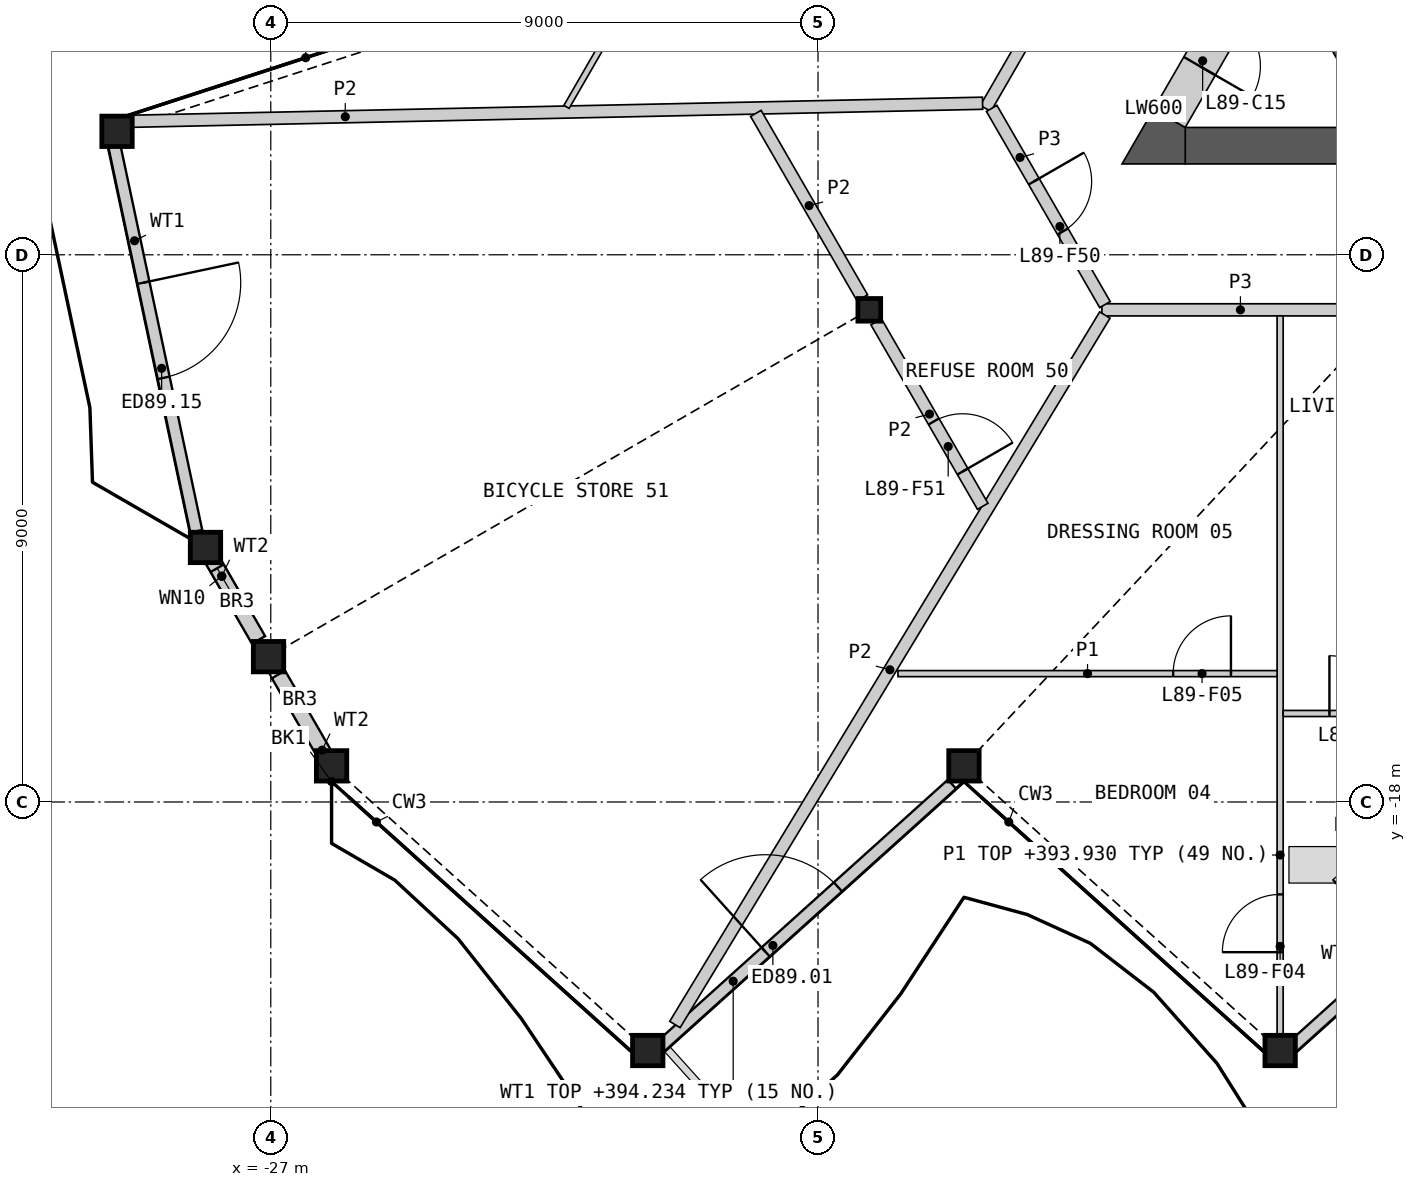
"""IFC4 building model, lengths in metres.
Left out: names, types, materials, properties, quantities, classifications, styles, units other than length and angle.
Written with IfcOpenShell. Run it as: python <this file> out.ifc"""

import sys

from ifc_helpers import new_model, si_unit, direction, frame, frame_2d, origin, origin_2d, place, context, subcontext, project, spatial, polyline, rectangle, hollow_rectangle, i_section, outline, extrude, element, fill, save


model = new_model("IFC4")
c1 = context("Model", 3, precision=1e-05, world=origin(), true_north=direction((0.0, 1.0)))
c2 = subcontext(c1, "Body", "Model", "MODEL_VIEW")
j1 = project(units=[si_unit("LENGTHUNIT", "METRE"), si_unit("PLANEANGLEUNIT", "RADIAN")], contexts=[c1])
p1 = place(None, origin())
s1 = spatial("IfcSite", under=j1, at=p1, CompositionType="ELEMENT")
p2 = place(p1, origin())
s2 = spatial("IfcBuilding", under=s1, at=p2, CompositionType="ELEMENT")
p3 = place(p2, frame((0.0, 0.0, 391.6)))
s3 = spatial("IfcBuildingStorey", under=s2, at=p3, CompositionType="ELEMENT", Elevation=391.6)
for number, where, z_axis, x_axis in (
    (1, (-26.0, -17.406, 0.0), (0.0, 0.0, 1.0), (1.0, 0.0, 0.0)),
    (2, (-20.8, -22.088, 0.0), (0.0, 0.0, 1.0), (1.0, 0.0, 0.0)),
    (3, (-15.6, -17.406, 0.0), (0.0, 0.0, 1.0), (1.0, 0.0, 0.0)),
    (4, (-10.4, -22.088, 0.0), (0.0, 0.0, 1.0), (1.0, 0.0, 0.0)),
    (5, (-29.529, -6.969, 0.0), (0.0, 0.0, 1.0), (1.0, 0.0, 0.0)),
    (6, (-28.074, -13.814, 0.0), (0.0, 0.0, 1.0), (1.0, 0.0, 0.0)),
    (7, (-27.037, -15.61, 0.0), (0.0, 0.0, 1.0), (1.0, 0.0, 0.0)),
):
    element("IfcColumn", number, at=place(p3, frame(where, z_axis=z_axis, x_axis=x_axis)), inside=s3, PredefinedType="COLUMN", context=c2, shape_type="SweptSolid", body=[
        extrude(hollow_rectangle(XDim=0.5, YDim=0.5, WallThickness=0.03, at=origin_2d()), origin(), (0.0, 0.0, 1.0), 3.4),
    ])
p4 = place(p3, frame((-17.157, -9.906, 0.0), z_axis=(0.0, 0.0, 1.0), x_axis=(1.0, 0.0, 0.0)))
e8 = element("IfcColumn", 8, at=p4, inside=s3, PredefinedType="COLUMN", context=c2, shape_type="SweptSolid", body=[
    extrude(i_section(OverallWidth=0.374, OverallDepth=0.372, WebThickness=0.016, FlangeThickness=0.026, at=origin_2d()), origin(), (0.0, 0.0, 1.0), 3.4),
])
p5 = place(p3, frame((-20.595, -22.028, 0.0), z_axis=(0.0, 0.0, 1.0), x_axis=(0.743153126052, 0.669121387522, 0.0)))
e9 = element("IfcWall", 9, at=p5, inside=s3, PredefinedType="SOLIDWALL", context=c2, shape_type="SweptSolid", body=[
    extrude(rectangle(XDim=6.457, YDim=0.2, at=frame_2d((3.229, 0.0))), origin(), (0.0, 0.0, 1.0), 2.634),
])
p6 = place(p5, frame((2.333, 0.0, 0.0)))
e10 = element("IfcOpeningElement", 10, at=p6, cuts=e9, PredefinedType="OPENING", context=c2, shape_type="SweptSolid", body=[
    extrude(rectangle(XDim=1.6, YDim=2.25, at=frame_2d((0.8, 1.125))), frame((0.0, 0.11, 0.0), z_axis=(0.0, -1.0, 0.0), x_axis=(1.0, 0.0, 0.0)), (0.0, 0.0, 1.0), 0.22),
])
p7 = place(p3, frame((-10.195, -22.028, 0.0), z_axis=(0.0, 0.0, 1.0), x_axis=(0.743136196971, 0.669140189162, 0.0)))
e11 = element("IfcWall", 11, at=p7, inside=s3, PredefinedType="SOLIDWALL", context=c2, shape_type="SweptSolid", body=[
    extrude(rectangle(XDim=6.457, YDim=0.2, at=frame_2d((3.229, 0.0))), origin(), (0.0, 0.0, 1.0), 2.634),
])
p8 = place(p7, frame((2.333, 0.0, 0.0)))
e12 = element("IfcOpeningElement", 12, at=p8, cuts=e11, PredefinedType="OPENING", context=c2, shape_type="SweptSolid", body=[
    extrude(rectangle(XDim=1.6, YDim=2.25, at=frame_2d((0.8, 1.125))), frame((0.0, 0.11, 0.0), z_axis=(0.0, -1.0, 0.0), x_axis=(1.0, 0.0, 0.0)), (0.0, 0.0, 1.0), 0.22),
])
p9 = place(p3, frame((-29.579, -7.177, 0.0), z_axis=(0.0, 0.0, 1.0), x_axis=(0.207910765171, -0.978147797486, 0.0)))
e13 = element("IfcWall", 13, at=p9, inside=s3, PredefinedType="SOLIDWALL", context=c2, shape_type="SweptSolid", body=[
    extrude(rectangle(XDim=6.512, YDim=0.2, at=frame_2d((3.256, 0.0))), origin(), (0.0, 0.0, 1.0), 2.634),
])
p10 = place(p9, frame((2.333, 0.0, 0.0)))
e14 = element("IfcOpeningElement", 14, at=p10, cuts=e13, PredefinedType="OPENING", context=c2, shape_type="SweptSolid", body=[
    extrude(rectangle(XDim=1.6, YDim=2.25, at=frame_2d((0.8, 1.125))), frame((0.0, 0.11, 0.0), z_axis=(0.0, -1.0, 0.0), x_axis=(1.0, 0.0, 0.0)), (0.0, 0.0, 1.0), 0.22),
])
p11 = place(p3, frame((-28.007, -13.939, 0.0), z_axis=(0.0, 0.0, 1.0), x_axis=(0.499967189098, -0.866044346339, 0.0)))
e15 = element("IfcWall", 15, at=p11, inside=s3, PredefinedType="SOLIDWALL", context=c2, shape_type="SweptSolid", body=[
    extrude(rectangle(XDim=1.612, YDim=0.25, at=frame_2d((0.806, 0.0))), origin(), (0.0, 0.0, 1.0), 2.634),
])
p12 = place(p11, frame((0.25, 0.0, 0.4)))
e16 = element("IfcOpeningElement", 16, at=p12, cuts=e15, PredefinedType="OPENING", context=c2, shape_type="SweptSolid", body=[
    extrude(rectangle(XDim=0.6, YDim=0.6, at=frame_2d((0.3, 0.3))), frame((0.0, 0.135, 0.0), z_axis=(0.0, -1.0, 0.0), x_axis=(1.0, 0.0, 0.0)), (0.0, 0.0, 1.0), 0.27),
])
p13 = place(p3, frame((-26.874, -15.902, 0.0), z_axis=(0.0, 0.0, 1.0), x_axis=(0.500017882314, -0.866015079179, 0.0)))
e17 = element("IfcWall", 17, at=p13, inside=s3, PredefinedType="SOLIDWALL", context=c2, shape_type="SweptSolid", body=[
    extrude(rectangle(XDim=1.598, YDim=0.25, at=frame_2d((0.799, 0.0))), origin(), (0.0, 0.0, 1.0), 2.634),
])
p14 = place(p3, origin())
e18 = element("IfcWall", 18, at=p14, inside=s3, PredefinedType="SHEAR", context=c2, shape_type="SweptSolid", body=[
    extrude(outline(polyline([(-10.374, -4.206), (-8.83, -6.881), (-8.738, -6.539), (-10.032, -4.298), (-10.374, -4.206)])), origin(), (0.0, 0.0, 1.0), 3.1),
])
p15 = place(p3, frame((-11.961, -7.206, 0.0), z_axis=(0.0, 0.0, 1.0), x_axis=(1.0, 0.0, 0.0)))
e19 = element("IfcWall", 19, at=p15, inside=s3, PredefinedType="SHEAR", context=c2, shape_type="SweptSolid", body=[
    extrude(rectangle(XDim=23.921, YDim=0.6, at=frame_2d((11.961, 0.0))), origin(), (0.0, 0.0, 1.0), 3.1),
])
p16 = place(p3, origin())
e20 = element("IfcWall", 20, at=p16, inside=s3, PredefinedType="SHEAR", context=c2, shape_type="SweptSolid", body=[
    extrude(outline(polyline([(-12.48, -6.606), (-11.961, -6.906), (-11.961, -7.506), (-13.0, -7.506), (-12.48, -6.606)])), origin(), (0.0, 0.0, 1.0), 3.1),
])
p17 = place(p3, frame((-10.925, -4.511, 0.0), z_axis=(0.0, 0.0, 1.0), x_axis=(-0.500018667571, -0.866014625789, 0.0)))
e21 = element("IfcWall", 21, at=p17, inside=s3, PredefinedType="SHEAR", context=c2, shape_type="SweptSolid", body=[
    extrude(rectangle(XDim=2.592, YDim=0.6, at=frame_2d((1.296, 0.0))), origin(), (0.0, 0.0, 1.0), 3.1),
])
p18 = place(p17, frame((0.6, 0.0, 0.0)))
e22 = element("IfcOpeningElement", 22, at=p18, cuts=e21, PredefinedType="OPENING", context=c2, shape_type="SweptSolid", body=[
    extrude(rectangle(XDim=1.0, YDim=2.1, at=frame_2d((0.5, 1.05))), frame((0.0, 0.31, 0.0), z_axis=(0.0, -1.0, 0.0), x_axis=(1.0, 0.0, 0.0)), (0.0, 0.0, 1.0), 0.62),
])
p19 = place(p3, frame((-13.331, -9.906, 0.0), z_axis=(0.0, 0.0, 1.0), x_axis=(1.0, 0.0, 0.0)))
e23 = element("IfcWall", 23, at=p19, inside=s3, PredefinedType="PARTITIONING", context=c2, shape_type="SweptSolid", body=[
    extrude(rectangle(XDim=4.555, YDim=0.2, at=frame_2d((2.278, 0.0))), origin(), (0.0, 0.0, 1.0), 3.1),
])
p20 = place(p3, frame((-15.244, -6.592, 0.0), z_axis=(0.0, 0.0, 1.0), x_axis=(0.499974648164, 0.866040040179, 0.0)))
e24 = element("IfcWall", 24, at=p20, inside=s3, PredefinedType="PARTITIONING", context=c2, shape_type="SweptSolid", body=[
    extrude(rectangle(XDim=4.525, YDim=0.2, at=frame_2d((2.263, 0.0))), origin(), (0.0, 0.0, 1.0), 3.1),
])
p21 = place(p3, frame((-15.144, -6.592, 0.0), z_axis=(0.0, 0.0, 1.0), x_axis=(0.499958791762, -0.866049194065, 0.0)))
e25 = element("IfcWall", 25, at=p21, inside=s3, PredefinedType="PARTITIONING", context=c2, shape_type="SweptSolid", body=[
    extrude(rectangle(XDim=3.726, YDim=0.2, at=frame_2d((1.863, 0.0))), origin(), (0.0, 0.0, 1.0), 3.1),
])
p22 = place(p21, frame((1.388, 0.0, 0.0)))
e26 = element("IfcOpeningElement", 26, at=p22, cuts=e25, PredefinedType="OPENING", context=c2, shape_type="SweptSolid", body=[
    extrude(rectangle(XDim=0.95, YDim=2.1, at=frame_2d((0.475, 1.05))), frame((0.0, 0.11, 0.0), z_axis=(0.0, -1.0, 0.0), x_axis=(1.0, 0.0, 0.0)), (0.0, 0.0, 1.0), 0.22),
])
p23 = place(p3, frame((-20.354, -21.66, 0.0), z_axis=(0.0, 0.0, 1.0), x_axis=(0.518240642668, 0.85523484277, 0.0)))
e27 = element("IfcWall", 27, at=p23, inside=s3, PredefinedType="PARTITIONING", context=c2, shape_type="SweptSolid", body=[
    extrude(rectangle(XDim=13.644, YDim=0.2, at=frame_2d((6.822, 0.0))), origin(), (0.0, 0.0, 1.0), 2.33),
])
p24 = place(p3, frame((-29.269, -6.804, 0.0), z_axis=(0.0, 0.0, 1.0), x_axis=(0.999775536303, 0.021186717777, 0.0)))
e28 = element("IfcWall", 28, at=p24, inside=s3, PredefinedType="PARTITIONING", context=c2, shape_type="SweptSolid", body=[
    extrude(rectangle(XDim=13.978, YDim=0.2, at=frame_2d((6.989, 0.0))), origin(), (0.0, 0.0, 1.0), 2.33),
])
p25 = place(p3, frame((-17.043, -10.103, 0.0), z_axis=(0.0, 0.0, 1.0), x_axis=(0.500005931509, -0.866021979199, 0.0)))
e29 = element("IfcWall", 29, at=p25, inside=s3, PredefinedType="PARTITIONING", context=c2, shape_type="SweptSolid", body=[
    extrude(rectangle(XDim=3.504, YDim=0.2, at=frame_2d((1.752, 0.0))), origin(), (0.0, 0.0, 1.0), 2.33),
])
p26 = place(p25, frame((1.893, 0.0, 0.0)))
e30 = element("IfcOpeningElement", 30, at=p26, cuts=e29, PredefinedType="OPENING", context=c2, shape_type="SweptSolid", body=[
    extrude(rectangle(XDim=0.95, YDim=2.1, at=frame_2d((0.475, 1.05))), frame((0.0, 0.11, 0.0), z_axis=(0.0, -1.0, 0.0), x_axis=(1.0, 0.0, 0.0)), (0.0, 0.0, 1.0), 0.22),
])
p27 = place(p3, frame((-19.022, -6.674, 0.0), z_axis=(0.0, 0.0, 1.0), x_axis=(0.499983843005, -0.866034731829, 0.0)))
e31 = element("IfcWall", 31, at=p27, inside=s3, PredefinedType="PARTITIONING", context=c2, shape_type="SweptSolid", body=[
    extrude(rectangle(XDim=3.503, YDim=0.2, at=frame_2d((1.752, 0.0))), origin(), (0.0, 0.0, 1.0), 2.33),
])
p28 = place(p3, frame((-10.4, -21.828, 0.0), z_axis=(0.0, 0.0, 1.0), x_axis=(0.0, 1.0, 0.0)))
e32 = element("IfcWall", 32, at=p28, inside=s3, PredefinedType="PARTITIONING", context=c2, shape_type="SweptSolid", body=[
    extrude(rectangle(XDim=11.822, YDim=0.1, at=frame_2d((5.911, 0.0))), origin(), (0.0, 0.0, 1.0), 2.33),
])
p29 = place(p28, frame((1.358, 0.0, 0.0)))
e33 = element("IfcOpeningElement", 33, at=p29, cuts=e32, PredefinedType="OPENING", context=c2, shape_type="SweptSolid", body=[
    extrude(rectangle(XDim=0.95, YDim=2.1, at=frame_2d((0.475, 1.05))), frame((0.0, 0.06, 0.0), z_axis=(0.0, -1.0, 0.0), x_axis=(1.0, 0.0, 0.0)), (0.0, 0.0, 1.0), 0.12),
])
p30 = place(p3, frame((-22.136, -6.567, 0.0), z_axis=(0.0, 0.0, 1.0), x_axis=(0.500016298831, 0.866015993445, 0.0)))
e34 = element("IfcWall", 34, at=p30, inside=s3, PredefinedType="PARTITIONING", context=c2, shape_type="SweptSolid", body=[
    extrude(rectangle(XDim=6.305, YDim=0.1, at=frame_2d((3.152, 0.0))), origin(), (0.0, 0.0, 1.0), 2.33),
])
p31 = place(p30, frame((2.88, 0.0, 0.0)))
e35 = element("IfcOpeningElement", 35, at=p31, cuts=e34, PredefinedType="OPENING", context=c2, shape_type="SweptSolid", body=[
    extrude(rectangle(XDim=0.95, YDim=2.1, at=frame_2d((0.475, 1.05))), frame((0.0, 0.06, 0.0), z_axis=(0.0, -1.0, 0.0), x_axis=(1.0, 0.0, 0.0)), (0.0, 0.0, 1.0), 0.12),
])
p32 = place(p3, frame((-16.685, -15.889, 0.0), z_axis=(0.0, 0.0, 1.0), x_axis=(1.0, 0.0, 0.0)))
e36 = element("IfcWall", 36, at=p32, inside=s3, PredefinedType="PARTITIONING", context=c2, shape_type="SweptSolid", body=[
    extrude(rectangle(XDim=6.235, YDim=0.1, at=frame_2d((3.118, 0.0))), origin(), (0.0, 0.0, 1.0), 2.33),
])
p33 = place(p32, frame((4.526, 0.0, 0.0)))
e37 = element("IfcOpeningElement", 37, at=p33, cuts=e36, PredefinedType="OPENING", context=c2, shape_type="SweptSolid", body=[
    extrude(rectangle(XDim=0.95, YDim=2.1, at=frame_2d((0.475, 1.05))), frame((0.0, 0.06, 0.0), z_axis=(0.0, -1.0, 0.0), x_axis=(1.0, 0.0, 0.0)), (0.0, 0.0, 1.0), 0.12),
])
p34 = place(p3, frame((-10.35, -16.544, 0.0), z_axis=(0.0, 0.0, 1.0), x_axis=(1.0, 0.0, 0.0)))
e38 = element("IfcWall", 38, at=p34, inside=s3, PredefinedType="PARTITIONING", context=c2, shape_type="SweptSolid", body=[
    extrude(rectangle(XDim=5.025, YDim=0.1, at=frame_2d((2.513, 0.0))), origin(), (0.0, 0.0, 1.0), 2.33),
])
p35 = place(p34, frame((0.761, 0.0, 0.0)))
e39 = element("IfcOpeningElement", 39, at=p35, cuts=e38, PredefinedType="OPENING", context=c2, shape_type="SweptSolid", body=[
    extrude(rectangle(XDim=0.95, YDim=2.1, at=frame_2d((0.475, 1.05))), frame((0.0, 0.06, 0.0), z_axis=(0.0, -1.0, 0.0), x_axis=(1.0, 0.0, 0.0)), (0.0, 0.0, 1.0), 0.12),
])
p36 = place(p6, origin())
e40 = element("IfcDoor", 40, at=p36, inside=s3, OperationType="DOUBLE_DOOR_SINGLE_SWING", PredefinedType="DOOR", context=c2, shape_type="SweptSolid", body=[
    extrude(rectangle(XDim=1.6, YDim=2.25, at=frame_2d((0.8, 1.125))), frame((0.0, 0.025, 0.0), z_axis=(0.0, -1.0, 0.0), x_axis=(1.0, 0.0, 0.0)), (0.0, 0.0, 1.0), 0.05),
])
fill(e10, e40)
p37 = place(p10, origin())
e41 = element("IfcDoor", 41, at=p37, inside=s3, OperationType="DOUBLE_DOOR_SINGLE_SWING", PredefinedType="DOOR", context=c2, shape_type="SweptSolid", body=[
    extrude(rectangle(XDim=1.6, YDim=2.25, at=frame_2d((0.8, 1.125))), frame((0.0, 0.025, 0.0), z_axis=(0.0, -1.0, 0.0), x_axis=(1.0, 0.0, 0.0)), (0.0, 0.0, 1.0), 0.05),
])
fill(e14, e41)
p38 = place(p12, origin())
e42 = element("IfcWindow", 42, at=p38, inside=s3, PartitioningType="SINGLE_PANEL", PredefinedType="WINDOW", context=c2, shape_type="SweptSolid", body=[
    extrude(rectangle(XDim=0.6, YDim=0.6, at=frame_2d((0.3, 0.3))), frame((0.0, 0.03, 0.0), z_axis=(0.0, -1.0, 0.0), x_axis=(1.0, 0.0, 0.0)), (0.0, 0.0, 1.0), 0.06),
])
fill(e16, e42)
p39 = place(p18, origin())
e43 = element("IfcDoor", 43, at=p39, inside=s3, OperationType="SINGLE_SWING_RIGHT", PredefinedType="DOOR", context=c2, shape_type="SweptSolid", body=[
    extrude(rectangle(XDim=1.0, YDim=2.1, at=frame_2d((0.5, 1.05))), frame((0.0, 0.055, 0.0), z_axis=(0.0, -1.0, 0.0), x_axis=(1.0, 0.0, 0.0)), (0.0, 0.0, 1.0), 0.05),
])
fill(e22, e43)
p40 = place(p35, origin())
e44 = element("IfcDoor", 44, at=p40, inside=s3, OperationType="SINGLE_SWING_LEFT", PredefinedType="DOOR", context=c2, shape_type="SweptSolid", body=[
    extrude(rectangle(XDim=0.95, YDim=2.1, at=frame_2d((0.475, 1.05))), frame((0.0, 0.025, 0.0), z_axis=(0.0, -1.0, 0.0), x_axis=(1.0, 0.0, 0.0)), (0.0, 0.0, 1.0), 0.05),
])
fill(e39, e44)
p41 = place(p29, origin())
e45 = element("IfcDoor", 45, at=p41, inside=s3, OperationType="SINGLE_SWING_LEFT", PredefinedType="DOOR", context=c2, shape_type="SweptSolid", body=[
    extrude(rectangle(XDim=0.95, YDim=2.1, at=frame_2d((0.475, 1.05))), frame((0.0, 0.025, 0.0), z_axis=(0.0, -1.0, 0.0), x_axis=(1.0, 0.0, 0.0)), (0.0, 0.0, 1.0), 0.05),
])
fill(e33, e45)
p42 = place(p33, origin())
e46 = element("IfcDoor", 46, at=p42, inside=s3, OperationType="SINGLE_SWING_RIGHT", PredefinedType="DOOR", context=c2, shape_type="SweptSolid", body=[
    extrude(rectangle(XDim=0.95, YDim=2.1, at=frame_2d((0.475, 1.05))), frame((0.0, 0.025, 0.0), z_axis=(0.0, -1.0, 0.0), x_axis=(1.0, 0.0, 0.0)), (0.0, 0.0, 1.0), 0.05),
])
fill(e37, e46)
p43 = place(p22, origin())
e47 = element("IfcDoor", 47, at=p43, inside=s3, OperationType="SINGLE_SWING_LEFT", PredefinedType="DOOR", context=c2, shape_type="SweptSolid", body=[
    extrude(rectangle(XDim=0.95, YDim=2.1, at=frame_2d((0.475, 1.05))), frame((0.0, 0.025, 0.0), z_axis=(0.0, -1.0, 0.0), x_axis=(1.0, 0.0, 0.0)), (0.0, 0.0, 1.0), 0.05),
])
fill(e26, e47)
p44 = place(p26, origin())
e48 = element("IfcDoor", 48, at=p44, inside=s3, OperationType="SINGLE_SWING_RIGHT", PredefinedType="DOOR", context=c2, shape_type="SweptSolid", body=[
    extrude(rectangle(XDim=0.95, YDim=2.1, at=frame_2d((0.475, 1.05))), frame((0.0, 0.025, 0.0), z_axis=(0.0, -1.0, 0.0), x_axis=(1.0, 0.0, 0.0)), (0.0, 0.0, 1.0), 0.05),
])
fill(e30, e48)
save(model, sys.argv[1])
